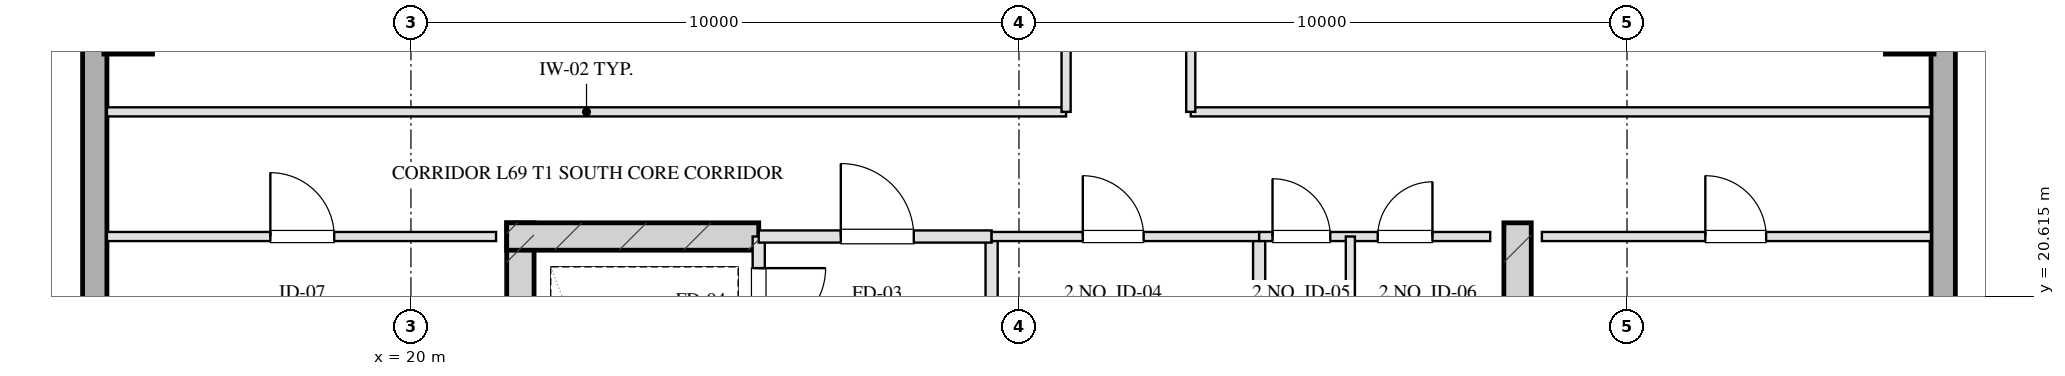
"""IFC4 building model, lengths in metres.
Left out: names, types, materials, properties, quantities, classifications, styles, units other than length and angle.
Written with IfcOpenShell. Run it as: python <this file> out.ifc"""

import sys

from ifc_helpers import new_model, si_unit, direction, frame, frame_2d, origin, origin_2d, place, context, subcontext, project, spatial, rectangle, hollow_rectangle, extrude, element, fill, save


model = new_model("IFC4")
c1 = context("Model", 3, precision=1e-05, world=origin(), true_north=direction((0.0, 1.0)))
c2 = subcontext(c1, "Body", "Model", "MODEL_VIEW")
j1 = project(units=[si_unit("LENGTHUNIT", "METRE"), si_unit("PLANEANGLEUNIT", "RADIAN")], contexts=[c1])
p1 = place(None, origin())
s1 = spatial("IfcSite", under=j1, at=p1, CompositionType="ELEMENT")
p2 = place(p1, origin())
s2 = spatial("IfcBuilding", under=s1, at=p2, CompositionType="ELEMENT")
p3 = place(p2, frame((0.0, 0.0, 253.6)))
s3 = spatial("IfcBuildingStorey", under=s2, at=p3, CompositionType="ELEMENT", Elevation=253.6)
for number, where, z_axis, x_axis in (
    (1, (21.8, 21.825, 0.0), (0.0, 0.0, 1.0), (0.0, -1.0, 0.0)),
    (2, (38.2, 21.825, 0.0), (0.0, 0.0, 1.0), (0.0, -1.0, 0.0)),
):
    element("IfcWall", number, at=place(p3, frame(where, z_axis=z_axis, x_axis=x_axis)), inside=s3, PredefinedType="SHEAR", context=c2, shape_type="SweptSolid", body=[
        extrude(rectangle(XDim=9.33, YDim=0.45, at=frame_2d((4.665, 0.0))), origin(), (0.0, 0.0, 1.0), 3.2),
    ])
p4 = place(p3, frame((21.575, 21.6, 0.0), z_axis=(0.0, 0.0, 1.0), x_axis=(1.0, 0.0, 0.0)))
e3 = element("IfcWall", 3, at=p4, inside=s3, PredefinedType="SHEAR", context=c2, shape_type="SweptSolid", body=[
    extrude(rectangle(XDim=4.145, YDim=0.45, at=frame_2d((2.073, 0.0))), origin(), (0.0, 0.0, 1.0), 3.2),
])
for number, where, z_axis, x_axis in (
    (4, (15.35, 25.0, 0.0), (0.0, 0.0, 1.0), (1.0, 0.0, 0.0)),
    (5, (44.65, 25.0, 0.0), (0.0, 0.0, 1.0), (1.0, 0.0, 0.0)),
):
    element("IfcColumn", number, at=place(p3, frame(where, z_axis=z_axis, x_axis=x_axis)), inside=s3, PredefinedType="COLUMN", context=c2, shape_type="SweptSolid", body=[
        extrude(hollow_rectangle(XDim=0.8, YDim=0.8, WallThickness=0.028, at=origin_2d()), origin(), (0.0, 0.0, 1.0), 3.201),
    ])
p5 = place(p3, frame((14.8, 13.1, 0.0), z_axis=(0.0, 0.0, 1.0), x_axis=(0.0, 1.0, 0.0)))
e6 = element("IfcWall", 6, at=p5, inside=s3, PredefinedType="SOLIDWALL", context=c2, shape_type="SweptSolid", body=[
    extrude(rectangle(XDim=41.8, YDim=0.4, at=frame_2d((20.9, 0.0))), origin(), (0.0, 0.0, 1.0), 2.36),
])
p6 = place(p5, frame((13.525, 0.0, 0.75)))
e7 = element("IfcOpeningElement", 7, at=p6, cuts=e6, PredefinedType="OPENING", context=c2, shape_type="SweptSolid", body=[
    extrude(rectangle(XDim=1.95, YDim=1.21, at=frame_2d((0.975, 0.605))), frame((0.0, 0.21, 0.0), z_axis=(0.0, -1.0, 0.0), x_axis=(1.0, 0.0, 0.0)), (0.0, 0.0, 1.0), 0.42),
])
p7 = place(p5, frame((17.325, 0.0, 0.75)))
e8 = element("IfcOpeningElement", 8, at=p7, cuts=e6, PredefinedType="OPENING", context=c2, shape_type="SweptSolid", body=[
    extrude(rectangle(XDim=1.95, YDim=1.21, at=frame_2d((0.975, 0.605))), frame((0.0, 0.21, 0.0), z_axis=(0.0, -1.0, 0.0), x_axis=(1.0, 0.0, 0.0)), (0.0, 0.0, 1.0), 0.42),
])
p8 = place(p5, frame((22.525, 0.0, 0.75)))
e9 = element("IfcOpeningElement", 9, at=p8, cuts=e6, PredefinedType="OPENING", context=c2, shape_type="SweptSolid", body=[
    extrude(rectangle(XDim=1.95, YDim=1.21, at=frame_2d((0.975, 0.605))), frame((0.0, 0.21, 0.0), z_axis=(0.0, -1.0, 0.0), x_axis=(1.0, 0.0, 0.0)), (0.0, 0.0, 1.0), 0.42),
])
p9 = place(p5, frame((26.325, 0.0, 0.75)))
e10 = element("IfcOpeningElement", 10, at=p9, cuts=e6, PredefinedType="OPENING", context=c2, shape_type="SweptSolid", body=[
    extrude(rectangle(XDim=1.95, YDim=1.21, at=frame_2d((0.975, 0.605))), frame((0.0, 0.21, 0.0), z_axis=(0.0, -1.0, 0.0), x_axis=(1.0, 0.0, 0.0)), (0.0, 0.0, 1.0), 0.42),
])
p10 = place(p3, frame((45.2, 54.9, 0.0), z_axis=(0.0, 0.0, 1.0), x_axis=(0.0, -1.0, 0.0)))
e11 = element("IfcWall", 11, at=p10, inside=s3, PredefinedType="SOLIDWALL", context=c2, shape_type="SweptSolid", body=[
    extrude(rectangle(XDim=41.8, YDim=0.4, at=frame_2d((20.9, 0.0))), origin(), (0.0, 0.0, 1.0), 2.36),
])
p11 = place(p10, frame((26.325, 0.0, 0.75)))
e12 = element("IfcOpeningElement", 12, at=p11, cuts=e11, PredefinedType="OPENING", context=c2, shape_type="SweptSolid", body=[
    extrude(rectangle(XDim=1.95, YDim=1.21, at=frame_2d((0.975, 0.605))), frame((0.0, 0.21, 0.0), z_axis=(0.0, -1.0, 0.0), x_axis=(1.0, 0.0, 0.0)), (0.0, 0.0, 1.0), 0.42),
])
p12 = place(p10, frame((22.525, 0.0, 0.75)))
e13 = element("IfcOpeningElement", 13, at=p12, cuts=e11, PredefinedType="OPENING", context=c2, shape_type="SweptSolid", body=[
    extrude(rectangle(XDim=1.95, YDim=1.21, at=frame_2d((0.975, 0.605))), frame((0.0, 0.21, 0.0), z_axis=(0.0, -1.0, 0.0), x_axis=(1.0, 0.0, 0.0)), (0.0, 0.0, 1.0), 0.42),
])
p13 = place(p10, frame((17.325, 0.0, 0.75)))
e14 = element("IfcOpeningElement", 14, at=p13, cuts=e11, PredefinedType="OPENING", context=c2, shape_type="SweptSolid", body=[
    extrude(rectangle(XDim=1.95, YDim=1.21, at=frame_2d((0.975, 0.605))), frame((0.0, 0.21, 0.0), z_axis=(0.0, -1.0, 0.0), x_axis=(1.0, 0.0, 0.0)), (0.0, 0.0, 1.0), 0.42),
])
p14 = place(p10, frame((13.525, 0.0, 0.75)))
e15 = element("IfcOpeningElement", 15, at=p14, cuts=e11, PredefinedType="OPENING", context=c2, shape_type="SweptSolid", body=[
    extrude(rectangle(XDim=1.95, YDim=1.21, at=frame_2d((0.975, 0.605))), frame((0.0, 0.21, 0.0), z_axis=(0.0, -1.0, 0.0), x_axis=(1.0, 0.0, 0.0)), (0.0, 0.0, 1.0), 0.42),
])
p15 = place(p3, frame((25.72, 21.6, 0.0), z_axis=(0.0, 0.0, 1.0), x_axis=(0.0, -1.0, 0.0)))
e16 = element("IfcWall", 16, at=p15, inside=s3, PredefinedType="PARTITIONING", context=c2, shape_type="SweptSolid", body=[
    extrude(rectangle(XDim=1.9, YDim=0.2, at=frame_2d((0.95, 0.0))), origin(), (0.0, 0.0, 1.0), 2.925),
])
p16 = place(p15, frame((0.52, 0.0, 0.0)))
e17 = element("IfcOpeningElement", 17, at=p16, cuts=e16, PredefinedType="OPENING", context=c2, shape_type="SweptSolid", body=[
    extrude(rectangle(XDim=1.1, YDim=2.05, at=frame_2d((0.55, 1.025))), frame((0.0, 0.11, 0.0), z_axis=(0.0, -1.0, 0.0), x_axis=(1.0, 0.0, 0.0)), (0.0, 0.0, 1.0), 0.22),
])
p17 = place(p3, frame((29.55, 21.6, 0.0), z_axis=(0.0, 0.0, 1.0), x_axis=(0.0, -1.0, 0.0)))
e18 = element("IfcWall", 18, at=p17, inside=s3, PredefinedType="PARTITIONING", context=c2, shape_type="SweptSolid", body=[
    extrude(rectangle(XDim=8.43, YDim=0.2, at=frame_2d((4.215, 0.0))), origin(), (0.0, 0.0, 1.0), 2.925),
])
p18 = place(p3, frame((25.72, 21.6, 0.0), z_axis=(0.0, 0.0, 1.0), x_axis=(1.0, 0.0, 0.0)))
e19 = element("IfcWall", 19, at=p18, inside=s3, PredefinedType="PARTITIONING", context=c2, shape_type="SweptSolid", body=[
    extrude(rectangle(XDim=3.83, YDim=0.2, at=frame_2d((1.915, 0.0))), origin(), (0.0, 0.0, 1.0), 2.925),
])
p19 = place(p18, frame((1.35, 0.0, 0.0)))
e20 = element("IfcOpeningElement", 20, at=p19, cuts=e19, PredefinedType="OPENING", context=c2, shape_type="SweptSolid", body=[
    extrude(rectangle(XDim=1.2, YDim=2.05, at=frame_2d((0.6, 1.025))), frame((0.0, 0.11, 0.0), z_axis=(0.0, -1.0, 0.0), x_axis=(1.0, 0.0, 0.0)), (0.0, 0.0, 1.0), 0.22),
])
p20 = place(p3, frame((33.95, 21.6, 0.0), z_axis=(0.0, 0.0, 1.0), x_axis=(0.0, -1.0, 0.0)))
e21 = element("IfcWall", 21, at=p20, inside=s3, PredefinedType="PARTITIONING", context=c2, shape_type="SweptSolid", body=[
    extrude(rectangle(XDim=8.43, YDim=0.2, at=frame_2d((4.215, 0.0))), origin(), (0.0, 0.0, 1.0), 2.925),
])
p21 = place(p3, frame((29.55, 21.6, 0.0), z_axis=(0.0, 0.0, 1.0), x_axis=(1.0, 0.0, 0.0)))
e22 = element("IfcWall", 22, at=p21, inside=s3, PredefinedType="PARTITIONING", context=c2, shape_type="SweptSolid", body=[
    extrude(rectangle(XDim=4.4, YDim=0.15, at=frame_2d((2.2, 0.0))), origin(), (0.0, 0.0, 1.0), 2.925),
])
p22 = place(p21, frame((1.5, 0.0, 0.0)))
e23 = element("IfcOpeningElement", 23, at=p22, cuts=e22, PredefinedType="OPENING", context=c2, shape_type="SweptSolid", body=[
    extrude(rectangle(XDim=1.0, YDim=2.05, at=frame_2d((0.5, 1.025))), frame((0.0, 0.085, 0.0), z_axis=(0.0, -1.0, 0.0), x_axis=(1.0, 0.0, 0.0)), (0.0, 0.0, 1.0), 0.17),
])
p23 = place(p3, frame((33.95, 21.6, 0.0), z_axis=(0.0, 0.0, 1.0), x_axis=(1.0, 0.0, 0.0)))
e24 = element("IfcWall", 24, at=p23, inside=s3, PredefinedType="PARTITIONING", context=c2, shape_type="SweptSolid", body=[
    extrude(rectangle(XDim=3.8, YDim=0.15, at=frame_2d((1.9, 0.0))), origin(), (0.0, 0.0, 1.0), 2.925),
])
p24 = place(p23, frame((0.22, 0.0, 0.0)))
e25 = element("IfcOpeningElement", 25, at=p24, cuts=e24, PredefinedType="OPENING", context=c2, shape_type="SweptSolid", body=[
    extrude(rectangle(XDim=0.95, YDim=2.05, at=frame_2d((0.475, 1.025))), frame((0.0, 0.085, 0.0), z_axis=(0.0, -1.0, 0.0), x_axis=(1.0, 0.0, 0.0)), (0.0, 0.0, 1.0), 0.17),
])
p25 = place(p23, frame((1.95, 0.0, 0.0)))
e26 = element("IfcOpeningElement", 26, at=p25, cuts=e24, PredefinedType="OPENING", context=c2, shape_type="SweptSolid", body=[
    extrude(rectangle(XDim=0.9, YDim=2.05, at=frame_2d((0.45, 1.025))), frame((0.0, 0.085, 0.0), z_axis=(0.0, -1.0, 0.0), x_axis=(1.0, 0.0, 0.0)), (0.0, 0.0, 1.0), 0.17),
])
p26 = place(p3, frame((35.45, 21.6, 0.0), z_axis=(0.0, 0.0, 1.0), x_axis=(0.0, -1.0, 0.0)))
e27 = element("IfcWall", 27, at=p26, inside=s3, PredefinedType="PARTITIONING", context=c2, shape_type="SweptSolid", body=[
    extrude(rectangle(XDim=8.43, YDim=0.15, at=frame_2d((4.215, 0.0))), origin(), (0.0, 0.0, 1.0), 2.565),
])
p27 = place(p26, frame((2.55, 0.0, 0.0)))
e28 = element("IfcOpeningElement", 28, at=p27, cuts=e27, PredefinedType="OPENING", context=c2, shape_type="SweptSolid", body=[
    extrude(rectangle(XDim=0.95, YDim=2.05, at=frame_2d((0.475, 1.025))), frame((0.0, 0.085, 0.0), z_axis=(0.0, -1.0, 0.0), x_axis=(1.0, 0.0, 0.0)), (0.0, 0.0, 1.0), 0.17),
])
p28 = place(p26, frame((5.6, 0.0, 0.0)))
e29 = element("IfcOpeningElement", 29, at=p28, cuts=e27, PredefinedType="OPENING", context=c2, shape_type="SweptSolid", body=[
    extrude(rectangle(XDim=0.9, YDim=2.05, at=frame_2d((0.45, 1.025))), frame((0.0, 0.085, 0.0), z_axis=(0.0, -1.0, 0.0), x_axis=(1.0, 0.0, 0.0)), (0.0, 0.0, 1.0), 0.17),
])
p29 = place(p3, frame((15.0, 21.6, 0.0), z_axis=(0.0, 0.0, 1.0), x_axis=(1.0, 0.0, 0.0)))
e30 = element("IfcWall", 30, at=p29, inside=s3, PredefinedType="PARTITIONING", context=c2, shape_type="SweptSolid", body=[
    extrude(rectangle(XDim=6.4, YDim=0.15, at=frame_2d((3.2, 0.0))), origin(), (0.0, 0.0, 1.0), 2.925),
])
p30 = place(p29, frame((2.688, 0.0, 0.0)))
e31 = element("IfcOpeningElement", 31, at=p30, cuts=e30, PredefinedType="OPENING", context=c2, shape_type="SweptSolid", body=[
    extrude(rectangle(XDim=1.05, YDim=2.05, at=frame_2d((0.525, 1.025))), frame((0.0, 0.085, 0.0), z_axis=(0.0, -1.0, 0.0), x_axis=(1.0, 0.0, 0.0)), (0.0, 0.0, 1.0), 0.17),
])
p31 = place(p3, frame((38.6, 21.6, 0.0), z_axis=(0.0, 0.0, 1.0), x_axis=(1.0, 0.0, 0.0)))
e32 = element("IfcWall", 32, at=p31, inside=s3, PredefinedType="PARTITIONING", context=c2, shape_type="SweptSolid", body=[
    extrude(rectangle(XDim=6.4, YDim=0.15, at=frame_2d((3.2, 0.0))), origin(), (0.0, 0.0, 1.0), 2.925),
])
p32 = place(p31, frame((2.688, 0.0, 0.0)))
e33 = element("IfcOpeningElement", 33, at=p32, cuts=e32, PredefinedType="OPENING", context=c2, shape_type="SweptSolid", body=[
    extrude(rectangle(XDim=1.0, YDim=2.05, at=frame_2d((0.5, 1.025))), frame((0.0, 0.085, 0.0), z_axis=(0.0, -1.0, 0.0), x_axis=(1.0, 0.0, 0.0)), (0.0, 0.0, 1.0), 0.17),
])
p33 = place(p3, frame((15.0, 23.65, 0.0), z_axis=(0.0, 0.0, 1.0), x_axis=(1.0, 0.0, 0.0)))
e34 = element("IfcWall", 34, at=p33, inside=s3, PredefinedType="PARTITIONING", context=c2, shape_type="SweptSolid", body=[
    extrude(rectangle(XDim=15.775, YDim=0.15, at=frame_2d((7.887, 0.0))), origin(), (0.0, 0.0, 1.0), 2.925),
])
p34 = place(p3, frame((32.825, 23.65, 0.0), z_axis=(0.0, 0.0, 1.0), x_axis=(1.0, 0.0, 0.0)))
e35 = element("IfcWall", 35, at=p34, inside=s3, PredefinedType="PARTITIONING", context=c2, shape_type="SweptSolid", body=[
    extrude(rectangle(XDim=12.175, YDim=0.15, at=frame_2d((6.087, 0.0))), origin(), (0.0, 0.0, 1.0), 2.925),
])
p35 = place(p3, frame((30.775, 23.65, 0.0), z_axis=(0.0, 0.0, 1.0), x_axis=(0.0, 1.0, 0.0)))
e36 = element("IfcWall", 36, at=p35, inside=s3, PredefinedType="PARTITIONING", context=c2, shape_type="SweptSolid", body=[
    extrude(rectangle(XDim=20.7, YDim=0.15, at=frame_2d((10.35, 0.0))), origin(), (0.0, 0.0, 1.0), 2.925),
])
p36 = place(p35, frame((2.175, 0.0, 0.0)))
e37 = element("IfcOpeningElement", 37, at=p36, cuts=e36, PredefinedType="OPENING", context=c2, shape_type="SweptSolid", body=[
    extrude(rectangle(XDim=1.0, YDim=2.05, at=frame_2d((0.5, 1.025))), frame((0.0, 0.085, 0.0), z_axis=(0.0, -1.0, 0.0), x_axis=(1.0, 0.0, 0.0)), (0.0, 0.0, 1.0), 0.17),
])
p37 = place(p35, frame((7.69, 0.0, 0.0)))
e38 = element("IfcOpeningElement", 38, at=p37, cuts=e36, PredefinedType="OPENING", context=c2, shape_type="SweptSolid", body=[
    extrude(rectangle(XDim=1.0, YDim=2.05, at=frame_2d((0.5, 1.025))), frame((0.0, 0.085, 0.0), z_axis=(0.0, -1.0, 0.0), x_axis=(1.0, 0.0, 0.0)), (0.0, 0.0, 1.0), 0.17),
])
p38 = place(p35, frame((12.69, 0.0, 0.0)))
e39 = element("IfcOpeningElement", 39, at=p38, cuts=e36, PredefinedType="OPENING", context=c2, shape_type="SweptSolid", body=[
    extrude(rectangle(XDim=1.0, YDim=2.05, at=frame_2d((0.5, 1.025))), frame((0.0, 0.085, 0.0), z_axis=(0.0, -1.0, 0.0), x_axis=(1.0, 0.0, 0.0)), (0.0, 0.0, 1.0), 0.17),
])
p39 = place(p35, frame((17.525, 0.0, 0.0)))
e40 = element("IfcOpeningElement", 40, at=p39, cuts=e36, PredefinedType="OPENING", context=c2, shape_type="SweptSolid", body=[
    extrude(rectangle(XDim=1.05, YDim=2.05, at=frame_2d((0.525, 1.025))), frame((0.0, 0.085, 0.0), z_axis=(0.0, -1.0, 0.0), x_axis=(1.0, 0.0, 0.0)), (0.0, 0.0, 1.0), 0.17),
])
p40 = place(p3, frame((32.825, 23.65, 0.0), z_axis=(0.0, 0.0, 1.0), x_axis=(0.0, 1.0, 0.0)))
e41 = element("IfcWall", 41, at=p40, inside=s3, PredefinedType="PARTITIONING", context=c2, shape_type="SweptSolid", body=[
    extrude(rectangle(XDim=20.7, YDim=0.15, at=frame_2d((10.35, 0.0))), origin(), (0.0, 0.0, 1.0), 2.925),
])
p41 = place(p40, frame((2.675, 0.0, 0.0)))
e42 = element("IfcOpeningElement", 42, at=p41, cuts=e41, PredefinedType="OPENING", context=c2, shape_type="SweptSolid", body=[
    extrude(rectangle(XDim=1.0, YDim=2.05, at=frame_2d((0.5, 1.025))), frame((0.0, 0.085, 0.0), z_axis=(0.0, -1.0, 0.0), x_axis=(1.0, 0.0, 0.0)), (0.0, 0.0, 1.0), 0.17),
])
p42 = place(p40, frame((9.85, 0.0, 0.0)))
e43 = element("IfcOpeningElement", 43, at=p42, cuts=e41, PredefinedType="OPENING", context=c2, shape_type="SweptSolid", body=[
    extrude(rectangle(XDim=1.0, YDim=2.05, at=frame_2d((0.5, 1.025))), frame((0.0, 0.085, 0.0), z_axis=(0.0, -1.0, 0.0), x_axis=(1.0, 0.0, 0.0)), (0.0, 0.0, 1.0), 0.17),
])
p43 = place(p40, frame((17.025, 0.0, 0.0)))
e44 = element("IfcOpeningElement", 44, at=p43, cuts=e41, PredefinedType="OPENING", context=c2, shape_type="SweptSolid", body=[
    extrude(rectangle(XDim=1.0, YDim=2.05, at=frame_2d((0.5, 1.025))), frame((0.0, 0.085, 0.0), z_axis=(0.0, -1.0, 0.0), x_axis=(1.0, 0.0, 0.0)), (0.0, 0.0, 1.0), 0.17),
])
p44 = place(p16, origin())
e45 = element("IfcDoor", 45, at=p44, inside=s3, OperationType="SINGLE_SWING_LEFT", PredefinedType="DOOR", context=c2, shape_type="SweptSolid", body=[
    extrude(rectangle(XDim=1.1, YDim=2.05, at=frame_2d((0.55, 1.025))), frame((0.0, 0.025, 0.0), z_axis=(0.0, -1.0, 0.0), x_axis=(1.0, 0.0, 0.0)), (0.0, 0.0, 1.0), 0.05),
])
fill(e17, e45)
p45 = place(p19, origin())
e46 = element("IfcDoor", 46, at=p45, inside=s3, OperationType="SINGLE_SWING_LEFT", PredefinedType="DOOR", context=c2, shape_type="SweptSolid", body=[
    extrude(rectangle(XDim=1.2, YDim=2.05, at=frame_2d((0.6, 1.025))), frame((0.0, 0.025, 0.0), z_axis=(0.0, -1.0, 0.0), x_axis=(1.0, 0.0, 0.0)), (0.0, 0.0, 1.0), 0.05),
])
fill(e20, e46)
p46 = place(p22, origin())
e47 = element("IfcDoor", 47, at=p46, inside=s3, OperationType="SINGLE_SWING_LEFT", PredefinedType="DOOR", context=c2, shape_type="SweptSolid", body=[
    extrude(rectangle(XDim=1.0, YDim=2.05, at=frame_2d((0.5, 1.025))), frame((0.0, 0.025, 0.0), z_axis=(0.0, -1.0, 0.0), x_axis=(1.0, 0.0, 0.0)), (0.0, 0.0, 1.0), 0.05),
])
fill(e23, e47)
p47 = place(p24, origin())
e48 = element("IfcDoor", 48, at=p47, inside=s3, OperationType="SINGLE_SWING_LEFT", PredefinedType="DOOR", context=c2, shape_type="SweptSolid", body=[
    extrude(rectangle(XDim=0.95, YDim=2.05, at=frame_2d((0.475, 1.025))), frame((0.0, 0.025, 0.0), z_axis=(0.0, -1.0, 0.0), x_axis=(1.0, 0.0, 0.0)), (0.0, 0.0, 1.0), 0.05),
])
fill(e25, e48)
p48 = place(p25, origin())
e49 = element("IfcDoor", 49, at=p48, inside=s3, OperationType="SINGLE_SWING_RIGHT", PredefinedType="DOOR", context=c2, shape_type="SweptSolid", body=[
    extrude(rectangle(XDim=0.9, YDim=2.05, at=frame_2d((0.45, 1.025))), frame((0.0, 0.025, 0.0), z_axis=(0.0, -1.0, 0.0), x_axis=(1.0, 0.0, 0.0)), (0.0, 0.0, 1.0), 0.05),
])
fill(e26, e49)
p49 = place(p30, origin())
e50 = element("IfcDoor", 50, at=p49, inside=s3, OperationType="SINGLE_SWING_LEFT", PredefinedType="DOOR", context=c2, shape_type="SweptSolid", body=[
    extrude(rectangle(XDim=1.05, YDim=2.05, at=frame_2d((0.525, 1.025))), frame((0.0, 0.025, 0.0), z_axis=(0.0, -1.0, 0.0), x_axis=(1.0, 0.0, 0.0)), (0.0, 0.0, 1.0), 0.05),
])
fill(e31, e50)
p50 = place(p32, origin())
e51 = element("IfcDoor", 51, at=p50, inside=s3, OperationType="SINGLE_SWING_LEFT", PredefinedType="DOOR", context=c2, shape_type="SweptSolid", body=[
    extrude(rectangle(XDim=1.0, YDim=2.05, at=frame_2d((0.5, 1.025))), frame((0.0, 0.025, 0.0), z_axis=(0.0, -1.0, 0.0), x_axis=(1.0, 0.0, 0.0)), (0.0, 0.0, 1.0), 0.05),
])
fill(e33, e51)
save(model, sys.argv[1])
